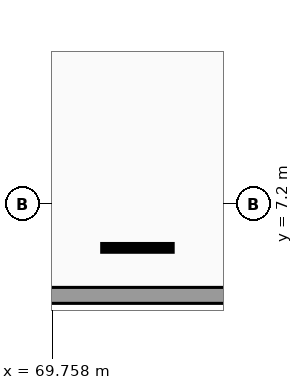
"""IFC4 building model, lengths in metres.
Left out: names, types, materials, properties, quantities, classifications, styles, units other than length and angle.
Written with IfcOpenShell. Run it as: python <this file> out.ifc"""

import sys

from ifc_helpers import new_model, si_unit, direction, frame, frame_2d, origin, place, context, subcontext, project, spatial, rectangle, extrude, element, save


model = new_model("IFC4")
c1 = context("Model", 3, precision=1e-05, world=origin(), true_north=direction((0.0, 1.0)))
c2 = subcontext(c1, "Body", "Model", "MODEL_VIEW")
j1 = project(units=[si_unit("LENGTHUNIT", "METRE"), si_unit("PLANEANGLEUNIT", "RADIAN")], contexts=[c1])
p1 = place(None, origin())
s1 = spatial("IfcSite", under=j1, at=p1, CompositionType="ELEMENT")
p2 = place(p1, origin())
s2 = spatial("IfcBuilding", under=s1, at=p2, CompositionType="ELEMENT")
p3 = place(p2, frame((0.0, 0.0, -4.08)))
s3 = spatial("IfcBuildingStorey", under=s2, at=p3, CompositionType="ELEMENT", Elevation=-4.08)
p4 = place(p3, frame((1.7, 4.8, 0.0), z_axis=(0.0, 0.0, 1.0), x_axis=(1.0, 0.0, 0.0)))
e1 = element("IfcWall", 1, at=p4, inside=s3, PredefinedType="SOLIDWALL", context=c2, shape_type="SweptSolid", body=[
    extrude(rectangle(XDim=73.4, YDim=0.42, at=frame_2d((36.7, 0.0))), origin(), (0.0, 0.0, 1.0), 3.76),
])
save(model, sys.argv[1])
